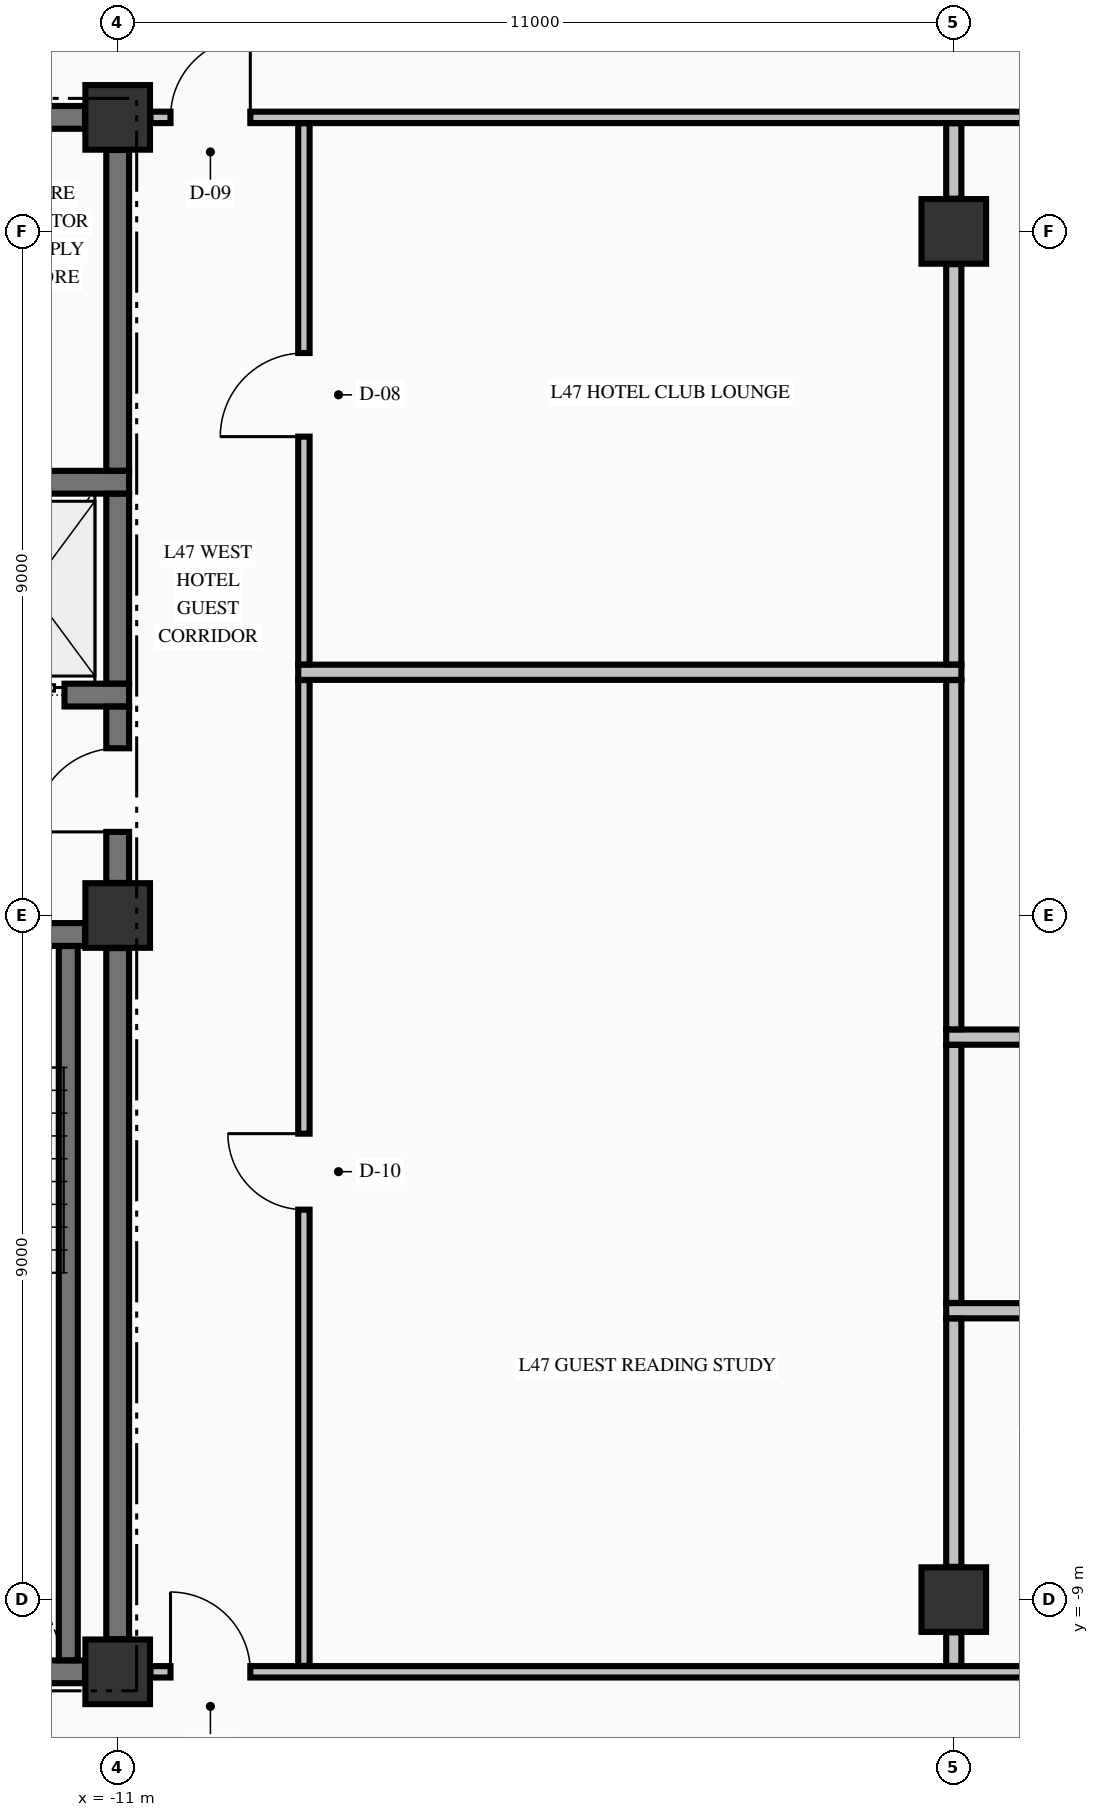
"""IFC4 building model, lengths in metres.
Left out: names, types, materials, properties, quantities, classifications, styles, units other than length and angle.
Written with IfcOpenShell. Run it as: python <this file> out.ifc"""

import sys

from ifc_helpers import new_model, si_unit, direction, frame, frame_2d, origin, origin_2d, place, context, subcontext, project, spatial, rectangle, extrude, element, fill, save


model = new_model("IFC4")
c1 = context("Model", 3, precision=1e-05, world=origin(), true_north=direction((0.0, 1.0)))
c2 = subcontext(c1, "Body", "Model", "MODEL_VIEW")
j1 = project(units=[si_unit("LENGTHUNIT", "METRE"), si_unit("PLANEANGLEUNIT", "RADIAN")], contexts=[c1])
p1 = place(None, origin())
s1 = spatial("IfcSite", under=j1, at=p1, CompositionType="ELEMENT")
p2 = place(p1, origin())
s2 = spatial("IfcBuilding", under=s1, at=p2, CompositionType="ELEMENT")
p3 = place(p2, frame((0.0, 0.0, 183.06)))
s3 = spatial("IfcBuildingStorey", under=s2, at=p3, CompositionType="ELEMENT", Elevation=183.06)
for number, where, z_axis, x_axis in (
    (1, (-11.0, -9.95, -0.25), (0.0, 0.0, 1.0), (1.0, 0.0, 0.0)),
    (2, (-11.0, 0.0, -0.25), (0.0, 0.0, 1.0), (1.0, 0.0, 0.0)),
    (3, (-11.0, 10.5, -0.25), (0.0, 0.0, 1.0), (1.0, 0.0, 0.0)),
    (4, (0.0, -9.0, -0.25), (0.0, 0.0, 1.0), (1.0, 0.0, 0.0)),
    (5, (0.0, 9.0, -0.25), (0.0, 0.0, 1.0), (1.0, 0.0, 0.0)),
):
    element("IfcColumn", number, at=place(p3, frame(where, z_axis=z_axis, x_axis=x_axis)), inside=s3, PredefinedType="COLUMN", context=c2, shape_type="SweptSolid", body=[
        extrude(rectangle(XDim=0.85, YDim=0.85, at=origin_2d()), origin(), (0.0, 0.0, 1.0), 3.225),
    ])
p4 = place(p3, frame((-14.7, -9.95, 0.0), z_axis=(0.0, 0.0, 1.0), x_axis=(1.0, 0.0, 0.0)))
e6 = element("IfcWall", 6, at=p4, inside=s3, PredefinedType="SHEAR", context=c2, shape_type="SweptSolid", body=[
    extrude(rectangle(XDim=3.271, YDim=0.3, at=frame_2d((1.635, 0.0))), origin(), (0.0, 0.0, 1.0), 2.975),
])
p5 = place(p3, frame((-19.571, -0.25, 0.0), z_axis=(0.0, 0.0, 1.0), x_axis=(1.0, 0.0, 0.0)))
e7 = element("IfcWall", 7, at=p5, inside=s3, PredefinedType="SHEAR", context=c2, shape_type="SweptSolid", body=[
    extrude(rectangle(XDim=8.142, YDim=0.3, at=frame_2d((4.071, 0.0))), origin(), (0.0, 0.0, 1.0), 2.975),
])
p6 = place(p5, frame((5.871, 0.0, 0.0)))
e8 = element("IfcOpeningElement", 8, at=p6, cuts=e7, PredefinedType="OPENING", context=c2, shape_type="SweptSolid", body=[
    extrude(rectangle(XDim=1.1, YDim=2.15, at=frame_2d((0.55, 1.075))), frame((0.0, 0.16, 0.0), z_axis=(0.0, -1.0, 0.0), x_axis=(1.0, 0.0, 0.0)), (0.0, 0.0, 1.0), 0.32),
])
p7 = place(p3, frame((-14.875, 2.9, 0.0), z_axis=(0.0, 0.0, 1.0), x_axis=(1.0, 0.0, 0.0)))
e9 = element("IfcWall", 9, at=p7, inside=s3, PredefinedType="SHEAR", context=c2, shape_type="SweptSolid", body=[
    extrude(rectangle(XDim=4.025, YDim=0.3, at=frame_2d((2.012, 0.0))), origin(), (0.0, 0.0, 1.0), 2.975),
])
p8 = place(p7, frame((2.075, 0.0, 0.0)))
e10 = element("IfcOpeningElement", 10, at=p8, cuts=e9, PredefinedType="OPENING", context=c2, shape_type="SweptSolid", body=[
    extrude(rectangle(XDim=1.1, YDim=2.2, at=frame_2d((0.55, 1.1))), frame((0.0, 0.16, 0.0), z_axis=(0.0, -1.0, 0.0), x_axis=(1.0, 0.0, 0.0)), (0.0, 0.0, 1.0), 0.32),
])
p9 = place(p3, frame((-14.875, 5.7, 0.0), z_axis=(0.0, 0.0, 1.0), x_axis=(1.0, 0.0, 0.0)))
e11 = element("IfcWall", 11, at=p9, inside=s3, PredefinedType="SHEAR", context=c2, shape_type="SweptSolid", body=[
    extrude(rectangle(XDim=4.025, YDim=0.3, at=frame_2d((2.012, 0.0))), origin(), (0.0, 0.0, 1.0), 2.975),
])
p10 = place(p3, frame((-14.7, 10.5, 0.0), z_axis=(0.0, 0.0, 1.0), x_axis=(1.0, 0.0, 0.0)))
e12 = element("IfcWall", 12, at=p10, inside=s3, PredefinedType="SHEAR", context=c2, shape_type="SweptSolid", body=[
    extrude(rectangle(XDim=3.271, YDim=0.3, at=frame_2d((1.635, 0.0))), origin(), (0.0, 0.0, 1.0), 2.975),
])
p11 = place(p10, frame((0.245, 0.0, 0.0)))
e13 = element("IfcOpeningElement", 13, at=p11, cuts=e12, PredefinedType="OPENING", context=c2, shape_type="SweptSolid", body=[
    extrude(rectangle(XDim=0.95, YDim=2.02, at=frame_2d((0.475, 1.01))), frame((0.0, 0.16, 0.0), z_axis=(0.0, -1.0, 0.0), x_axis=(1.0, 0.0, 0.0)), (0.0, 0.0, 1.0), 0.32),
])
p12 = place(p3, frame((-10.569, -9.95, 0.0), z_axis=(0.0, 0.0, 1.0), x_axis=(1.0, 0.0, 0.0)))
e14 = element("IfcWall", 14, at=p12, inside=s3, PredefinedType="PARTITIONING", context=c2, shape_type="SweptSolid", body=[
    extrude(rectangle(XDim=21.138, YDim=0.15, at=frame_2d((10.569, 0.0))), origin(), (0.0, 0.0, 1.0), 2.975),
])
p13 = place(p12, frame((0.264, 0.0, 0.0)))
e15 = element("IfcOpeningElement", 15, at=p13, cuts=e14, PredefinedType="OPENING", context=c2, shape_type="SweptSolid", body=[
    extrude(rectangle(XDim=1.05, YDim=2.15, at=frame_2d((0.525, 1.075))), frame((0.0, 0.085, 0.0), z_axis=(0.0, -1.0, 0.0), x_axis=(1.0, 0.0, 0.0)), (0.0, 0.0, 1.0), 0.17),
])
p14 = place(p12, frame((19.824, 0.0, 0.0)))
e16 = element("IfcOpeningElement", 16, at=p14, cuts=e14, PredefinedType="OPENING", context=c2, shape_type="SweptSolid", body=[
    extrude(rectangle(XDim=1.05, YDim=2.15, at=frame_2d((0.525, 1.075))), frame((0.0, 0.085, 0.0), z_axis=(0.0, -1.0, 0.0), x_axis=(1.0, 0.0, 0.0)), (0.0, 0.0, 1.0), 0.17),
])
p15 = place(p12, frame((12.874, 0.0, 0.0)))
e17 = element("IfcOpeningElement", 17, at=p15, cuts=e14, PredefinedType="OPENING", context=c2, shape_type="SweptSolid", body=[
    extrude(rectangle(XDim=0.95, YDim=2.15, at=frame_2d((0.475, 1.075))), frame((0.0, 0.085, 0.0), z_axis=(0.0, -1.0, 0.0), x_axis=(1.0, 0.0, 0.0)), (0.0, 0.0, 1.0), 0.17),
])
for number, where, z_axis, x_axis in (
    (18, (-0.1, -5.2, 0.0), (0.0, 0.0, 1.0), (1.0, 0.0, 0.0)),
    (19, (-0.1, -1.6, 0.0), (0.0, 0.0, 1.0), (1.0, 0.0, 0.0)),
    (20, (-8.625, 3.2, 0.0), (0.0, 0.0, 1.0), (1.0, 0.0, 0.0)),
):
    element("IfcWall", number, at=place(p3, frame(where, z_axis=z_axis, x_axis=x_axis)), inside=s3, PredefinedType="PARTITIONING", context=c2, shape_type="SweptSolid", body=[
        extrude(rectangle(XDim=8.725, YDim=0.2, at=frame_2d((4.363, 0.0))), origin(), (0.0, 0.0, 1.0), 2.975),
    ])
p16 = place(p3, frame((-10.569, 10.5, 0.0), z_axis=(0.0, 0.0, 1.0), x_axis=(1.0, 0.0, 0.0)))
e21 = element("IfcWall", 21, at=p16, inside=s3, PredefinedType="PARTITIONING", context=c2, shape_type="SweptSolid", body=[
    extrude(rectangle(XDim=21.138, YDim=0.15, at=frame_2d((10.569, 0.0))), origin(), (0.0, 0.0, 1.0), 2.975),
])
p17 = place(p16, frame((0.264, 0.0, 0.0)))
e22 = element("IfcOpeningElement", 22, at=p17, cuts=e21, PredefinedType="OPENING", context=c2, shape_type="SweptSolid", body=[
    extrude(rectangle(XDim=1.05, YDim=2.15, at=frame_2d((0.525, 1.075))), frame((0.0, 0.085, 0.0), z_axis=(0.0, -1.0, 0.0), x_axis=(1.0, 0.0, 0.0)), (0.0, 0.0, 1.0), 0.17),
])
p18 = place(p16, frame((19.824, 0.0, 0.0)))
e23 = element("IfcOpeningElement", 23, at=p18, cuts=e21, PredefinedType="OPENING", context=c2, shape_type="SweptSolid", body=[
    extrude(rectangle(XDim=1.05, YDim=2.15, at=frame_2d((0.525, 1.075))), frame((0.0, 0.085, 0.0), z_axis=(0.0, -1.0, 0.0), x_axis=(1.0, 0.0, 0.0)), (0.0, 0.0, 1.0), 0.17),
])
p19 = place(p3, frame((-11.65, -9.798, 0.0), z_axis=(0.0, 0.0, 1.0), x_axis=(0.0, 1.0, 0.0)))
e24 = element("IfcWall", 24, at=p19, inside=s3, PredefinedType="SOLIDWALL", context=c2, shape_type="SweptSolid", body=[
    extrude(rectangle(XDim=9.396, YDim=0.25, at=frame_2d((4.698, 0.0))), origin(), (0.0, 0.0, 1.0), 2.975),
])
p20 = place(p3, frame((-11.0, -9.521, 0.0), z_axis=(0.0, 0.0, 1.0), x_axis=(0.0, 1.0, 0.0)))
e25 = element("IfcWall", 25, at=p20, inside=s3, PredefinedType="SHEAR", context=c2, shape_type="SweptSolid", body=[
    extrude(rectangle(XDim=9.092, YDim=0.3, at=frame_2d((4.546, 0.0))), origin(), (0.0, 0.0, 1.0), 2.975),
])
p21 = place(p3, frame((-11.0, 0.429, 0.0), z_axis=(0.0, 0.0, 1.0), x_axis=(0.0, 1.0, 0.0)))
e26 = element("IfcWall", 26, at=p21, inside=s3, PredefinedType="SHEAR", context=c2, shape_type="SweptSolid", body=[
    extrude(rectangle(XDim=2.319, YDim=0.3, at=frame_2d((1.16, 0.0))), origin(), (0.0, 0.0, 1.0), 2.975),
])
p22 = place(p21, frame((0.671, 0.0, 0.0)))
e27 = element("IfcOpeningElement", 27, at=p22, cuts=e26, PredefinedType="OPENING", context=c2, shape_type="SweptSolid", body=[
    extrude(rectangle(XDim=1.1, YDim=2.15, at=frame_2d((0.55, 1.075))), frame((0.0, 0.16, 0.0), z_axis=(0.0, -1.0, 0.0), x_axis=(1.0, 0.0, 0.0)), (0.0, 0.0, 1.0), 0.32),
])
p23 = place(p3, frame((-11.0, 3.052, 0.0), z_axis=(0.0, 0.0, 1.0), x_axis=(0.0, 1.0, 0.0)))
e28 = element("IfcWall", 28, at=p23, inside=s3, PredefinedType="SHEAR", context=c2, shape_type="SweptSolid", body=[
    extrude(rectangle(XDim=2.496, YDim=0.3, at=frame_2d((1.248, 0.0))), origin(), (0.0, 0.0, 1.0), 2.975),
])
p24 = place(p3, frame((-11.0, 5.852, 0.0), z_axis=(0.0, 0.0, 1.0), x_axis=(0.0, 1.0, 0.0)))
e29 = element("IfcWall", 29, at=p24, inside=s3, PredefinedType="SHEAR", context=c2, shape_type="SweptSolid", body=[
    extrude(rectangle(XDim=4.219, YDim=0.3, at=frame_2d((2.109, 0.0))), origin(), (0.0, 0.0, 1.0), 2.975),
])
p25 = place(p3, frame((-8.55, -9.872, 0.0), z_axis=(0.0, 0.0, 1.0), x_axis=(0.0, 1.0, 0.0)))
e30 = element("IfcWall", 30, at=p25, inside=s3, PredefinedType="PARTITIONING", context=c2, shape_type="SweptSolid", body=[
    extrude(rectangle(XDim=12.969, YDim=0.15, at=frame_2d((6.484, 0.0))), origin(), (0.0, 0.0, 1.0), 2.975),
])
p26 = place(p25, frame((6.002, 0.0, 0.0)))
e31 = element("IfcOpeningElement", 31, at=p26, cuts=e30, PredefinedType="OPENING", context=c2, shape_type="SweptSolid", body=[
    extrude(rectangle(XDim=1.0, YDim=2.15, at=frame_2d((0.5, 1.075))), frame((0.0, 0.085, 0.0), z_axis=(0.0, -1.0, 0.0), x_axis=(1.0, 0.0, 0.0)), (0.0, 0.0, 1.0), 0.17),
])
p27 = place(p3, frame((-8.55, 3.303, 0.0), z_axis=(0.0, 0.0, 1.0), x_axis=(0.0, 1.0, 0.0)))
e32 = element("IfcWall", 32, at=p27, inside=s3, PredefinedType="PARTITIONING", context=c2, shape_type="SweptSolid", body=[
    extrude(rectangle(XDim=7.119, YDim=0.15, at=frame_2d((3.56, 0.0))), origin(), (0.0, 0.0, 1.0), 2.975),
])
p28 = place(p27, frame((2.997, 0.0, 0.0)))
e33 = element("IfcOpeningElement", 33, at=p28, cuts=e32, PredefinedType="OPENING", context=c2, shape_type="SweptSolid", body=[
    extrude(rectangle(XDim=1.1, YDim=2.15, at=frame_2d((0.55, 1.075))), frame((0.0, 0.085, 0.0), z_axis=(0.0, -1.0, 0.0), x_axis=(1.0, 0.0, 0.0)), (0.0, 0.0, 1.0), 0.17),
])
p29 = place(p3, frame((0.0, -9.872, 0.0), z_axis=(0.0, 0.0, 1.0), x_axis=(0.0, 1.0, 0.0)))
e34 = element("IfcWall", 34, at=p29, inside=s3, PredefinedType="PARTITIONING", context=c2, shape_type="SweptSolid", body=[
    extrude(rectangle(XDim=0.441, YDim=0.2, at=frame_2d((0.221, 0.0))), origin(), (0.0, 0.0, 1.0), 2.167),
])
p30 = place(p3, frame((0.0, -8.569, 0.0), z_axis=(0.0, 0.0, 1.0), x_axis=(0.0, 1.0, 0.0)))
e35 = element("IfcWall", 35, at=p30, inside=s3, PredefinedType="PARTITIONING", context=c2, shape_type="SweptSolid", body=[
    extrude(rectangle(XDim=3.266, YDim=0.2, at=frame_2d((1.633, 0.0))), origin(), (0.0, 0.0, 1.0), 2.167),
])
p31 = place(p3, frame((0.0, -5.097, 0.0), z_axis=(0.0, 0.0, 1.0), x_axis=(0.0, 1.0, 0.0)))
e36 = element("IfcWall", 36, at=p31, inside=s3, PredefinedType="PARTITIONING", context=c2, shape_type="SweptSolid", body=[
    extrude(rectangle(XDim=3.394, YDim=0.2, at=frame_2d((1.697, 0.0))), origin(), (0.0, 0.0, 1.0), 2.167),
])
p32 = place(p3, frame((0.0, -1.497, 0.0), z_axis=(0.0, 0.0, 1.0), x_axis=(0.0, 1.0, 0.0)))
e37 = element("IfcWall", 37, at=p32, inside=s3, PredefinedType="PARTITIONING", context=c2, shape_type="SweptSolid", body=[
    extrude(rectangle(XDim=4.594, YDim=0.2, at=frame_2d((2.297, 0.0))), origin(), (0.0, 0.0, 1.0), 2.167),
])
p33 = place(p3, frame((0.0, 3.303, 0.0), z_axis=(0.0, 0.0, 1.0), x_axis=(0.0, 1.0, 0.0)))
e38 = element("IfcWall", 38, at=p33, inside=s3, PredefinedType="PARTITIONING", context=c2, shape_type="SweptSolid", body=[
    extrude(rectangle(XDim=5.266, YDim=0.2, at=frame_2d((2.633, 0.0))), origin(), (0.0, 0.0, 1.0), 2.167),
])
p34 = place(p3, frame((0.0, 9.431, 0.0), z_axis=(0.0, 0.0, 1.0), x_axis=(0.0, 1.0, 0.0)))
e39 = element("IfcWall", 39, at=p34, inside=s3, PredefinedType="PARTITIONING", context=c2, shape_type="SweptSolid", body=[
    extrude(rectangle(XDim=0.991, YDim=0.2, at=frame_2d((0.496, 0.0))), origin(), (0.0, 0.0, 1.0), 2.167),
])
p35 = place(p22, origin())
e40 = element("IfcDoor", 40, at=p35, inside=s3, OperationType="SINGLE_SWING_LEFT", PredefinedType="DOOR", context=c2, shape_type="SweptSolid", body=[
    extrude(rectangle(XDim=1.1, YDim=2.15, at=frame_2d((0.55, 1.075))), frame((0.0, 0.025, 0.0), z_axis=(0.0, -1.0, 0.0), x_axis=(1.0, 0.0, 0.0)), (0.0, 0.0, 1.0), 0.05),
])
fill(e27, e40)
p36 = place(p8, origin())
e41 = element("IfcDoor", 41, at=p36, inside=s3, OperationType="SLIDING_TO_LEFT", PredefinedType="DOOR", context=c2, shape_type="SweptSolid", body=[
    extrude(rectangle(XDim=1.1, YDim=2.2, at=frame_2d((0.55, 1.1))), frame((0.0, 0.025, 0.0), z_axis=(0.0, -1.0, 0.0), x_axis=(1.0, 0.0, 0.0)), (0.0, 0.0, 1.0), 0.05),
])
fill(e10, e41)
p37 = place(p17, origin())
e42 = element("IfcDoor", 42, at=p37, inside=s3, OperationType="SINGLE_SWING_RIGHT", PredefinedType="DOOR", context=c2, shape_type="SweptSolid", body=[
    extrude(rectangle(XDim=1.05, YDim=2.15, at=frame_2d((0.525, 1.075))), frame((0.0, 0.025, 0.0), z_axis=(0.0, -1.0, 0.0), x_axis=(1.0, 0.0, 0.0)), (0.0, 0.0, 1.0), 0.05),
])
fill(e22, e42)
p38 = place(p13, origin())
e43 = element("IfcDoor", 43, at=p38, inside=s3, OperationType="SINGLE_SWING_LEFT", PredefinedType="DOOR", context=c2, shape_type="SweptSolid", body=[
    extrude(rectangle(XDim=1.05, YDim=2.15, at=frame_2d((0.525, 1.075))), frame((0.0, 0.025, 0.0), z_axis=(0.0, -1.0, 0.0), x_axis=(1.0, 0.0, 0.0)), (0.0, 0.0, 1.0), 0.05),
])
fill(e15, e43)
p39 = place(p28, origin())
e44 = element("IfcDoor", 44, at=p39, inside=s3, OperationType="SINGLE_SWING_LEFT", PredefinedType="DOOR", context=c2, shape_type="SweptSolid", body=[
    extrude(rectangle(XDim=1.1, YDim=2.15, at=frame_2d((0.55, 1.075))), frame((0.0, 0.025, 0.0), z_axis=(0.0, -1.0, 0.0), x_axis=(1.0, 0.0, 0.0)), (0.0, 0.0, 1.0), 0.05),
])
fill(e33, e44)
p40 = place(p26, origin())
e45 = element("IfcDoor", 45, at=p40, inside=s3, OperationType="SINGLE_SWING_RIGHT", PredefinedType="DOOR", context=c2, shape_type="SweptSolid", body=[
    extrude(rectangle(XDim=1.0, YDim=2.15, at=frame_2d((0.5, 1.075))), frame((0.0, 0.025, 0.0), z_axis=(0.0, -1.0, 0.0), x_axis=(1.0, 0.0, 0.0)), (0.0, 0.0, 1.0), 0.05),
])
fill(e31, e45)
save(model, sys.argv[1])
